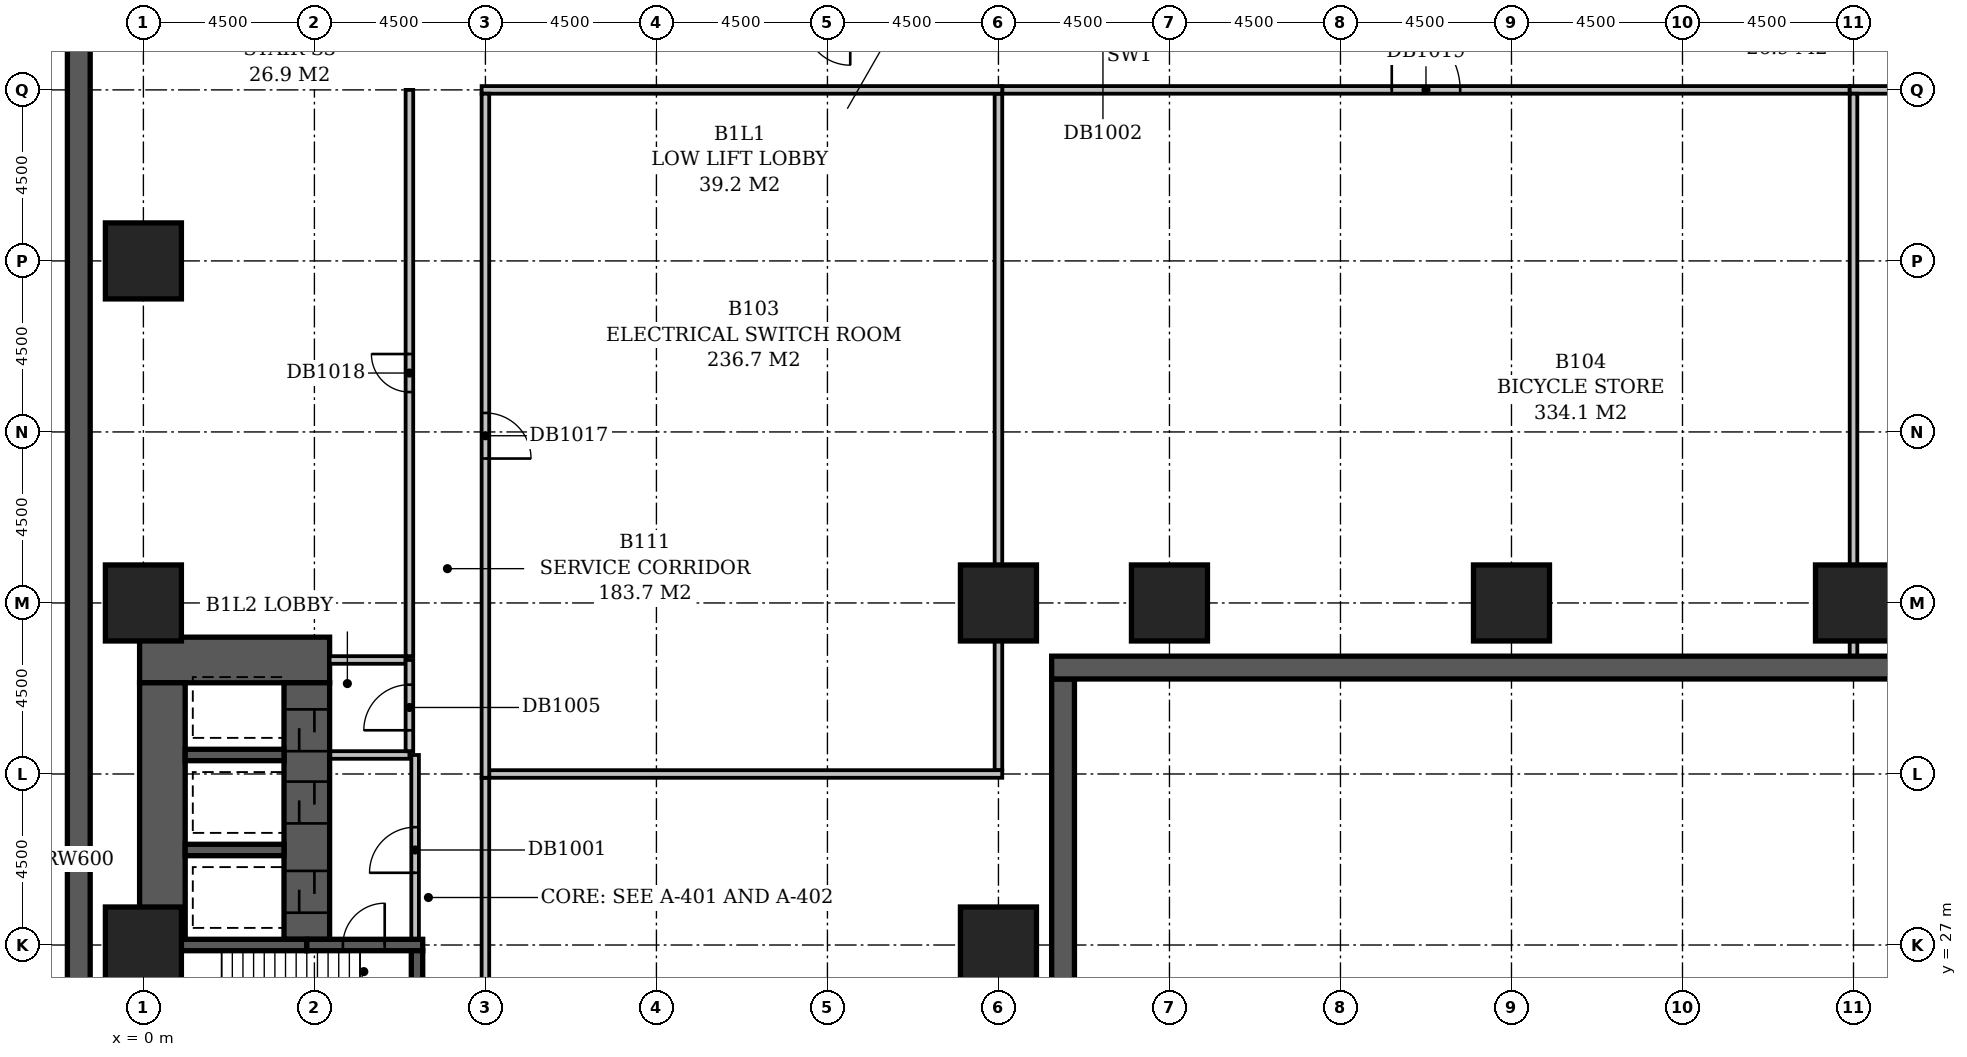
"""IFC4 building model, lengths in metres.
Left out: names, types, materials, properties, quantities, classifications, styles, units other than length and angle.
Written with IfcOpenShell. Run it as: python <this file> out.ifc"""

import sys

from ifc_helpers import new_model, si_unit, direction, frame, frame_2d, origin, origin_2d, place, context, subcontext, project, spatial, rectangle, extrude, element, fill, save


model = new_model("IFC4")
c1 = context("Model", 3, precision=1e-05, world=origin(), true_north=direction((0.0, 1.0)))
c2 = subcontext(c1, "Body", "Model", "MODEL_VIEW")
j1 = project(units=[si_unit("LENGTHUNIT", "METRE"), si_unit("PLANEANGLEUNIT", "RADIAN")], contexts=[c1])
p1 = place(None, origin())
s1 = spatial("IfcSite", under=j1, at=p1, CompositionType="ELEMENT")
p2 = place(p1, origin())
s2 = spatial("IfcBuilding", under=s1, at=p2, CompositionType="ELEMENT")
p3 = place(p2, frame((0.0, 0.0, -4.5)))
s3 = spatial("IfcBuildingStorey", under=s2, at=p3, CompositionType="ELEMENT", Elevation=-4.5)
for number, where, z_axis, x_axis in (
    (1, (0.0, 27.0, -0.4), (0.0, 0.0, 1.0), (1.0, 0.0, 0.0)),
    (2, (22.5, 27.0, -0.4), (0.0, 0.0, 1.0), (1.0, 0.0, 0.0)),
    (3, (0.0, 36.0, -0.4), (0.0, 0.0, 1.0), (1.0, 0.0, 0.0)),
    (4, (22.5, 36.0, -0.4), (0.0, 0.0, 1.0), (1.0, 0.0, 0.0)),
    (5, (27.0, 36.0, -0.4), (0.0, 0.0, 1.0), (1.0, 0.0, 0.0)),
    (6, (36.0, 36.0, -0.4), (0.0, 0.0, 1.0), (1.0, 0.0, 0.0)),
    (7, (45.0, 36.0, -0.4), (0.0, 0.0, 1.0), (1.0, 0.0, 0.0)),
    (8, (0.0, 45.0, -0.4), (0.0, 0.0, 1.0), (1.0, 0.0, 0.0)),
):
    element("IfcColumn", number, at=place(p3, frame(where, z_axis=z_axis, x_axis=x_axis)), inside=s3, PredefinedType="COLUMN", context=c2, shape_type="SweptSolid", body=[
        extrude(rectangle(XDim=2.0, YDim=2.0, at=origin_2d()), origin(), (0.0, 0.0, 1.0), 4.45),
    ])
p4 = place(p3, frame((-1.7, -1.4, -0.4), z_axis=(0.0, 0.0, 1.0), x_axis=(0.0, 1.0, 0.0)))
e9 = element("IfcWall", 9, at=p4, inside=s3, PredefinedType="SOLIDWALL", context=c2, shape_type="SweptSolid", body=[
    extrude(rectangle(XDim=61.3, YDim=0.6, at=frame_2d((30.65, 0.0))), origin(), (0.0, 0.0, 1.0), 4.45),
])
p5 = place(p3, frame((69.5, 34.3, -0.4), z_axis=(0.0, 0.0, 1.0), x_axis=(-1.0, 0.0, 0.0)))
e10 = element("IfcWall", 10, at=p5, inside=s3, PredefinedType="SOLIDWALL", context=c2, shape_type="SweptSolid", body=[
    extrude(rectangle(XDim=45.6, YDim=0.6, at=frame_2d((22.8, 0.0))), origin(), (0.0, 0.0, 1.0), 4.45),
])
p6 = place(p3, frame((24.2, 34.0, -0.4), z_axis=(0.0, 0.0, 1.0), x_axis=(0.0, -1.0, 0.0)))
e11 = element("IfcWall", 11, at=p6, inside=s3, PredefinedType="SOLIDWALL", context=c2, shape_type="SweptSolid", body=[
    extrude(rectangle(XDim=17.4, YDim=0.6, at=frame_2d((8.7, 0.0))), origin(), (0.0, 0.0, 1.0), 4.45),
])
p7 = place(p3, frame((0.35, 27.0, -0.4), z_axis=(0.0, 0.0, 1.0), x_axis=(1.0, 0.0, 0.0)))
e12 = element("IfcWall", 12, at=p7, inside=s3, PredefinedType="SHEAR", context=c2, shape_type="SweptSolid", body=[
    extrude(rectangle(XDim=3.95, YDim=0.3, at=frame_2d((1.975, 0.0))), origin(), (0.0, 0.0, 1.0), 4.45),
])
p8 = place(p3, frame((4.3, 27.0, -0.4), z_axis=(0.0, 0.0, 1.0), x_axis=(1.0, 0.0, 0.0)))
e13 = element("IfcWall", 13, at=p8, inside=s3, PredefinedType="SHEAR", context=c2, shape_type="SweptSolid", body=[
    extrude(rectangle(XDim=3.05, YDim=0.3, at=frame_2d((1.525, 0.0))), origin(), (0.0, 0.0, 1.0), 4.45),
])
p9 = place(p8, frame((0.95, 0.0, 0.4)))
e14 = element("IfcOpeningElement", 14, at=p9, cuts=e13, PredefinedType="OPENING", context=c2, shape_type="SweptSolid", body=[
    extrude(rectangle(XDim=1.1, YDim=2.1, at=frame_2d((0.55, 1.05))), frame((0.0, 0.162, 0.0), z_axis=(0.0, -1.0, 0.0), x_axis=(1.0, 0.0, 0.0)), (0.0, 0.0, 1.0), 0.324),
])
for number, where, z_axis, x_axis in (
    (15, (1.1, 29.5, -0.4), (0.0, 0.0, 1.0), (1.0, 0.0, 0.0)),
    (16, (1.1, 32.0, -0.4), (0.0, 0.0, 1.0), (1.0, 0.0, 0.0)),
):
    element("IfcWall", number, at=place(p3, frame(where, z_axis=z_axis, x_axis=x_axis)), inside=s3, PredefinedType="SHEAR", context=c2, shape_type="SweptSolid", body=[
        extrude(rectangle(XDim=2.6, YDim=0.3, at=frame_2d((1.3, 0.0))), origin(), (0.0, 0.0, 1.0), 4.45),
    ])
p10 = place(p3, frame((-0.1, 34.5, -0.4), z_axis=(0.0, 0.0, 1.0), x_axis=(1.0, 0.0, 0.0)))
e17 = element("IfcWall", 17, at=p10, inside=s3, PredefinedType="SHEAR", context=c2, shape_type="SweptSolid", body=[
    extrude(rectangle(XDim=5.0, YDim=1.2, at=frame_2d((2.5, 0.0))), origin(), (0.0, 0.0, 1.0), 4.45),
])
p11 = place(p3, frame((0.5, 22.5, -0.4), z_axis=(0.0, 0.0, 1.0), x_axis=(0.0, 1.0, 0.0)))
e18 = element("IfcWall", 18, at=p11, inside=s3, PredefinedType="SHEAR", context=c2, shape_type="SweptSolid", body=[
    extrude(rectangle(XDim=4.5, YDim=0.3, at=frame_2d((2.25, 0.0))), origin(), (0.0, 0.0, 1.0), 4.45),
])
p12 = place(p3, frame((0.5, 27.0, -0.4), z_axis=(0.0, 0.0, 1.0), x_axis=(0.0, 1.0, 0.0)))
e19 = element("IfcWall", 19, at=p12, inside=s3, PredefinedType="SHEAR", context=c2, shape_type="SweptSolid", body=[
    extrude(rectangle(XDim=6.9, YDim=1.2, at=frame_2d((3.45, 0.0))), origin(), (0.0, 0.0, 1.0), 4.45),
])
p13 = place(p3, frame((4.3, 27.15, -0.4), z_axis=(0.0, 0.0, 1.0), x_axis=(0.0, 1.0, 0.0)))
e20 = element("IfcWall", 20, at=p13, inside=s3, PredefinedType="SHEAR", context=c2, shape_type="SweptSolid", body=[
    extrude(rectangle(XDim=6.75, YDim=1.2, at=frame_2d((3.375, 0.0))), origin(), (0.0, 0.0, 1.0), 4.45),
])
p14 = place(p13, frame((3.05, 0.0, 0.4)))
e21 = element("IfcOpeningElement", 21, at=p14, cuts=e20, PredefinedType="OPENING", context=c2, shape_type="SweptSolid", body=[
    extrude(rectangle(XDim=1.1, YDim=2.1, at=frame_2d((0.55, 1.05))), frame((0.0, 0.612, 0.0), z_axis=(0.0, -1.0, 0.0), x_axis=(1.0, 0.0, 0.0)), (0.0, 0.0, 1.0), 1.224),
])
p15 = place(p13, frame((0.7, 0.0, 0.4)))
e22 = element("IfcOpeningElement", 22, at=p15, cuts=e20, PredefinedType="OPENING", context=c2, shape_type="SweptSolid", body=[
    extrude(rectangle(XDim=1.1, YDim=2.1, at=frame_2d((0.55, 1.05))), frame((0.0, 0.612, 0.0), z_axis=(0.0, -1.0, 0.0), x_axis=(1.0, 0.0, 0.0)), (0.0, 0.0, 1.0), 1.224),
])
p16 = place(p13, frame((4.95, 0.0, 0.4)))
e23 = element("IfcOpeningElement", 23, at=p16, cuts=e20, PredefinedType="OPENING", context=c2, shape_type="SweptSolid", body=[
    extrude(rectangle(XDim=1.1, YDim=2.1, at=frame_2d((0.55, 1.05))), frame((0.0, 0.612, 0.0), z_axis=(0.0, -1.0, 0.0), x_axis=(1.0, 0.0, 0.0)), (0.0, 0.0, 1.0), 1.224),
])
p17 = place(p3, frame((7.2, 22.65, -0.4), z_axis=(0.0, 0.0, 1.0), x_axis=(0.0, 1.0, 0.0)))
e24 = element("IfcWall", 24, at=p17, inside=s3, PredefinedType="SHEAR", context=c2, shape_type="SweptSolid", body=[
    extrude(rectangle(XDim=4.2, YDim=0.3, at=frame_2d((2.1, 0.0))), origin(), (0.0, 0.0, 1.0), 4.45),
])
p18 = place(p17, frame((0.8, 0.0, 0.4)))
e25 = element("IfcOpeningElement", 25, at=p18, cuts=e24, PredefinedType="OPENING", context=c2, shape_type="SweptSolid", body=[
    extrude(rectangle(XDim=1.1, YDim=2.1, at=frame_2d((0.55, 1.05))), frame((0.0, 0.162, 0.0), z_axis=(0.0, -1.0, 0.0), x_axis=(1.0, 0.0, 0.0)), (0.0, 0.0, 1.0), 0.324),
])
p19 = place(p3, frame((4.92, 32.0, 0.0), z_axis=(0.0, 0.0, 1.0), x_axis=(1.0, 0.0, 0.0)))
e26 = element("IfcWall", 26, at=p19, inside=s3, PredefinedType="PARTITIONING", context=c2, shape_type="SweptSolid", body=[
    extrude(rectangle(XDim=2.08, YDim=0.2, at=frame_2d((1.04, 0.0))), origin(), (0.0, 0.0, 1.0), 4.05),
])
p20 = place(p3, frame((7.0, 32.1, 0.0), z_axis=(0.0, 0.0, 1.0), x_axis=(0.0, 1.0, 0.0)))
e27 = element("IfcWall", 27, at=p20, inside=s3, PredefinedType="PARTITIONING", context=c2, shape_type="SweptSolid", body=[
    extrude(rectangle(XDim=2.4, YDim=0.2, at=frame_2d((1.2, 0.0))), origin(), (0.0, 0.0, 1.0), 4.05),
])
p21 = place(p20, frame((0.55, 0.0, 0.0)))
e28 = element("IfcOpeningElement", 28, at=p21, cuts=e27, PredefinedType="OPENING", context=c2, shape_type="SweptSolid", body=[
    extrude(rectangle(XDim=1.2, YDim=2.1, at=frame_2d((0.6, 1.05))), frame((0.0, 0.112, 0.0), z_axis=(0.0, -1.0, 0.0), x_axis=(1.0, 0.0, 0.0)), (0.0, 0.0, 1.0), 0.224),
])
p22 = place(p3, frame((4.9, 34.5, 0.0), z_axis=(0.0, 0.0, 1.0), x_axis=(1.0, 0.0, 0.0)))
e29 = element("IfcWall", 29, at=p22, inside=s3, PredefinedType="PARTITIONING", context=c2, shape_type="SweptSolid", body=[
    extrude(rectangle(XDim=2.0, YDim=0.2, at=frame_2d((1.0, 0.0))), origin(), (0.0, 0.0, 1.0), 4.05),
])
p23 = place(p3, frame((7.15, 27.17, 0.0), z_axis=(0.0, 0.0, 1.0), x_axis=(0.0, 1.0, 0.0)))
e30 = element("IfcWall", 30, at=p23, inside=s3, PredefinedType="PARTITIONING", context=c2, shape_type="SweptSolid", body=[
    extrude(rectangle(XDim=4.83, YDim=0.2, at=frame_2d((2.415, 0.0))), origin(), (0.0, 0.0, 1.0), 4.05),
])
p24 = place(p23, frame((1.73, 0.0, 0.0)))
e31 = element("IfcOpeningElement", 31, at=p24, cuts=e30, PredefinedType="OPENING", context=c2, shape_type="SweptSolid", body=[
    extrude(rectangle(XDim=1.2, YDim=2.1, at=frame_2d((0.6, 1.05))), frame((0.0, 0.112, 0.0), z_axis=(0.0, -1.0, 0.0), x_axis=(1.0, 0.0, 0.0)), (0.0, 0.0, 1.0), 0.224),
])
p25 = place(p3, frame((9.0, 18.0, 0.0), z_axis=(0.0, 0.0, 1.0), x_axis=(0.0, 1.0, 0.0)))
e32 = element("IfcWall", 32, at=p25, inside=s3, PredefinedType="PARTITIONING", context=c2, shape_type="SweptSolid", body=[
    extrude(rectangle(XDim=13.4, YDim=0.2, at=frame_2d((6.7, 0.0))), origin(), (0.0, 0.0, 1.0), 4.05),
])
p26 = place(p25, frame((6.15, 0.0, 0.0)))
e33 = element("IfcOpeningElement", 33, at=p26, cuts=e32, PredefinedType="OPENING", context=c2, shape_type="SweptSolid", body=[
    extrude(rectangle(XDim=1.0, YDim=2.1, at=frame_2d((0.5, 1.05))), frame((0.0, 0.112, 0.0), z_axis=(0.0, -1.0, 0.0), x_axis=(1.0, 0.0, 0.0)), (0.0, 0.0, 1.0), 0.224),
])
p27 = place(p3, frame((9.0, 31.4, 0.0), z_axis=(0.0, 0.0, 1.0), x_axis=(0.0, 1.0, 0.0)))
e34 = element("IfcWall", 34, at=p27, inside=s3, PredefinedType="PARTITIONING", context=c2, shape_type="SweptSolid", body=[
    extrude(rectangle(XDim=18.0, YDim=0.2, at=frame_2d((9.0, 0.0))), origin(), (0.0, 0.0, 1.0), 4.05),
])
p28 = place(p27, frame((8.4, 0.0, 0.0)))
e35 = element("IfcOpeningElement", 35, at=p28, cuts=e34, PredefinedType="OPENING", context=c2, shape_type="SweptSolid", body=[
    extrude(rectangle(XDim=1.2, YDim=2.1, at=frame_2d((0.6, 1.05))), frame((0.0, 0.112, 0.0), z_axis=(0.0, -1.0, 0.0), x_axis=(1.0, 0.0, 0.0)), (0.0, 0.0, 1.0), 0.224),
])
p29 = place(p3, frame((22.6, 31.5, 0.0), z_axis=(0.0, 0.0, 1.0), x_axis=(-1.0, 0.0, 0.0)))
e36 = element("IfcWall", 36, at=p29, inside=s3, PredefinedType="PARTITIONING", context=c2, shape_type="SweptSolid", body=[
    extrude(rectangle(XDim=13.5, YDim=0.2, at=frame_2d((6.75, 0.0))), origin(), (0.0, 0.0, 1.0), 4.05),
])
p30 = place(p3, frame((45.0, 34.6, 0.0), z_axis=(0.0, 0.0, 1.0), x_axis=(0.0, 1.0, 0.0)))
e37 = element("IfcWall", 37, at=p30, inside=s3, PredefinedType="PARTITIONING", context=c2, shape_type="SweptSolid", body=[
    extrude(rectangle(XDim=14.8, YDim=0.2, at=frame_2d((7.4, 0.0))), origin(), (0.0, 0.0, 1.0), 3.35),
])
p31 = place(p3, frame((7.0, 49.5, 0.0), z_axis=(0.0, 0.0, 1.0), x_axis=(0.0, -1.0, 0.0)))
e38 = element("IfcWall", 38, at=p31, inside=s3, PredefinedType="PARTITIONING", context=c2, shape_type="SweptSolid", body=[
    extrude(rectangle(XDim=14.9, YDim=0.2, at=frame_2d((7.45, 0.0))), origin(), (0.0, 0.0, 1.0), 4.05),
])
p32 = place(p31, frame((6.95, 0.0, 0.0)))
e39 = element("IfcOpeningElement", 39, at=p32, cuts=e38, PredefinedType="OPENING", context=c2, shape_type="SweptSolid", body=[
    extrude(rectangle(XDim=1.0, YDim=2.1, at=frame_2d((0.5, 1.05))), frame((0.0, 0.112, 0.0), z_axis=(0.0, -1.0, 0.0), x_axis=(1.0, 0.0, 0.0)), (0.0, 0.0, 1.0), 0.224),
])
p33 = place(p3, frame((8.9, 49.5, 0.0), z_axis=(0.0, 0.0, 1.0), x_axis=(1.0, 0.0, 0.0)))
e40 = element("IfcWall", 40, at=p33, inside=s3, PredefinedType="PARTITIONING", context=c2, shape_type="SweptSolid", body=[
    extrude(rectangle(XDim=13.7, YDim=0.2, at=frame_2d((6.85, 0.0))), origin(), (0.0, 0.0, 1.0), 4.05),
])
p34 = place(p3, frame((22.5, 49.4, 0.0), z_axis=(0.0, 0.0, 1.0), x_axis=(0.0, -1.0, 0.0)))
e41 = element("IfcWall", 41, at=p34, inside=s3, PredefinedType="PARTITIONING", context=c2, shape_type="SweptSolid", body=[
    extrude(rectangle(XDim=17.8, YDim=0.2, at=frame_2d((8.9, 0.0))), origin(), (0.0, 0.0, 1.0), 3.3),
])
p35 = place(p3, frame((22.6, 49.5, 0.0), z_axis=(0.0, 0.0, 1.0), x_axis=(1.0, 0.0, 0.0)))
e42 = element("IfcWall", 42, at=p35, inside=s3, PredefinedType="PARTITIONING", context=c2, shape_type="SweptSolid", body=[
    extrude(rectangle(XDim=22.3, YDim=0.2, at=frame_2d((11.15, 0.0))), origin(), (0.0, 0.0, 1.0), 4.05),
])
p36 = place(p35, frame((10.25, 0.0, 0.0)))
e43 = element("IfcOpeningElement", 43, at=p36, cuts=e42, PredefinedType="OPENING", context=c2, shape_type="SweptSolid", body=[
    extrude(rectangle(XDim=1.8, YDim=2.4, at=frame_2d((0.9, 1.2))), frame((0.0, 0.112, 0.0), z_axis=(0.0, -1.0, 0.0), x_axis=(1.0, 0.0, 0.0)), (0.0, 0.0, 1.0), 0.224),
])
p37 = place(p3, frame((44.9, 49.5, 0.0), z_axis=(0.0, 0.0, 1.0), x_axis=(1.0, 0.0, 0.0)))
e44 = element("IfcWall", 44, at=p37, inside=s3, PredefinedType="PARTITIONING", context=c2, shape_type="SweptSolid", body=[
    extrude(rectangle(XDim=13.5, YDim=0.2, at=frame_2d((6.75, 0.0))), origin(), (0.0, 0.0, 1.0), 4.05),
])
p38 = place(p37, frame((6.15, 0.0, 0.0)))
e45 = element("IfcOpeningElement", 45, at=p38, cuts=e44, PredefinedType="OPENING", context=c2, shape_type="SweptSolid", body=[
    extrude(rectangle(XDim=1.2, YDim=2.1, at=frame_2d((0.6, 1.05))), frame((0.0, 0.112, 0.0), z_axis=(0.0, -1.0, 0.0), x_axis=(1.0, 0.0, 0.0)), (0.0, 0.0, 1.0), 0.224),
])
p39 = place(p24, origin())
e46 = element("IfcDoor", 46, at=p39, inside=s3, OperationType="SINGLE_SWING_LEFT", PredefinedType="DOOR", context=c2, shape_type="SweptSolid", body=[
    extrude(rectangle(XDim=1.2, YDim=2.1, at=frame_2d((0.6, 1.05))), frame((0.0, 0.025, 0.0), z_axis=(0.0, -1.0, 0.0), x_axis=(1.0, 0.0, 0.0)), (0.0, 0.0, 1.0), 0.05),
])
fill(e31, e46)
p40 = place(p14, origin())
e47 = element("IfcDoor", 47, at=p40, inside=s3, OperationType="SLIDING_TO_LEFT", PredefinedType="DOOR", context=c2, shape_type="SweptSolid", body=[
    extrude(rectangle(XDim=1.1, YDim=2.1, at=frame_2d((0.55, 1.05))), frame((0.0, 0.025, 0.0), z_axis=(0.0, -1.0, 0.0), x_axis=(1.0, 0.0, 0.0)), (0.0, 0.0, 1.0), 0.05),
])
fill(e21, e47)
p41 = place(p15, origin())
e48 = element("IfcDoor", 48, at=p41, inside=s3, OperationType="SLIDING_TO_LEFT", PredefinedType="DOOR", context=c2, shape_type="SweptSolid", body=[
    extrude(rectangle(XDim=1.1, YDim=2.1, at=frame_2d((0.55, 1.05))), frame((0.0, 0.025, 0.0), z_axis=(0.0, -1.0, 0.0), x_axis=(1.0, 0.0, 0.0)), (0.0, 0.0, 1.0), 0.05),
])
fill(e22, e48)
p42 = place(p21, origin())
e49 = element("IfcDoor", 49, at=p42, inside=s3, OperationType="SINGLE_SWING_LEFT", PredefinedType="DOOR", context=c2, shape_type="SweptSolid", body=[
    extrude(rectangle(XDim=1.2, YDim=2.1, at=frame_2d((0.6, 1.05))), frame((0.0, 0.025, 0.0), z_axis=(0.0, -1.0, 0.0), x_axis=(1.0, 0.0, 0.0)), (0.0, 0.0, 1.0), 0.05),
])
fill(e28, e49)
p43 = place(p16, origin())
e50 = element("IfcDoor", 50, at=p43, inside=s3, OperationType="SLIDING_TO_LEFT", PredefinedType="DOOR", context=c2, shape_type="SweptSolid", body=[
    extrude(rectangle(XDim=1.1, YDim=2.1, at=frame_2d((0.55, 1.05))), frame((0.0, 0.025, 0.0), z_axis=(0.0, -1.0, 0.0), x_axis=(1.0, 0.0, 0.0)), (0.0, 0.0, 1.0), 0.05),
])
fill(e23, e50)
p44 = place(p9, frame((1.1, 0.0, 0.0), z_axis=(0.0, 0.0, 1.0), x_axis=(-1.0, 0.0, 0.0)))
e51 = element("IfcDoor", 51, at=p44, inside=s3, OperationType="SINGLE_SWING_LEFT", PredefinedType="DOOR", context=c2, shape_type="SweptSolid", body=[
    extrude(rectangle(XDim=1.1, YDim=2.1, at=frame_2d((0.55, 1.05))), frame((0.0, 0.025, 0.0), z_axis=(0.0, -1.0, 0.0), x_axis=(1.0, 0.0, 0.0)), (0.0, 0.0, 1.0), 0.05),
])
fill(e14, e51)
p45 = place(p28, frame((1.2, 0.0, 0.0), z_axis=(0.0, 0.0, 1.0), x_axis=(-1.0, 0.0, 0.0)))
e52 = element("IfcDoor", 52, at=p45, inside=s3, OperationType="SINGLE_SWING_RIGHT", PredefinedType="DOOR", context=c2, shape_type="SweptSolid", body=[
    extrude(rectangle(XDim=1.2, YDim=2.1, at=frame_2d((0.6, 1.05))), frame((0.0, 0.025, 0.0), z_axis=(0.0, -1.0, 0.0), x_axis=(1.0, 0.0, 0.0)), (0.0, 0.0, 1.0), 0.05),
])
fill(e35, e52)
p46 = place(p32, frame((1.0, 0.0, 0.0), z_axis=(0.0, 0.0, 1.0), x_axis=(-1.0, 0.0, 0.0)))
e53 = element("IfcDoor", 53, at=p46, inside=s3, OperationType="SINGLE_SWING_RIGHT", PredefinedType="DOOR", context=c2, shape_type="SweptSolid", body=[
    extrude(rectangle(XDim=1.0, YDim=2.1, at=frame_2d((0.5, 1.05))), frame((0.0, 0.025, 0.0), z_axis=(0.0, -1.0, 0.0), x_axis=(1.0, 0.0, 0.0)), (0.0, 0.0, 1.0), 0.05),
])
fill(e39, e53)
p47 = place(p36, origin())
e54 = element("IfcDoor", 54, at=p47, inside=s3, OperationType="DOUBLE_DOOR_SINGLE_SWING", PredefinedType="DOOR", context=c2, shape_type="SweptSolid", body=[
    extrude(rectangle(XDim=1.8, YDim=2.4, at=frame_2d((0.9, 1.2))), frame((0.0, 0.025, 0.0), z_axis=(0.0, -1.0, 0.0), x_axis=(1.0, 0.0, 0.0)), (0.0, 0.0, 1.0), 0.05),
])
fill(e43, e54)
save(model, sys.argv[1])
